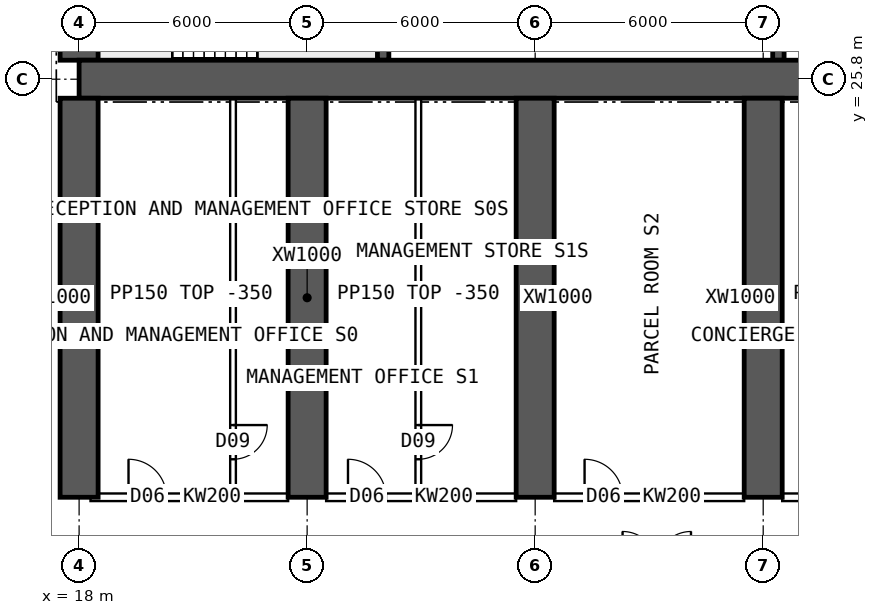
"""IFC4 building model, lengths in metres.
Left out: names, types, materials, properties, quantities, classifications, styles, units other than length and angle.
Written with IfcOpenShell. Run it as: python <this file> out.ifc"""

import sys

from ifc_helpers import new_model, si_unit, direction, frame, frame_2d, origin, place, context, subcontext, project, spatial, rectangle, extrude, element, fill, save


model = new_model("IFC4")
c1 = context("Model", 3, precision=1e-05, world=origin(), true_north=direction((0.0, 1.0)))
c2 = subcontext(c1, "Body", "Model", "MODEL_VIEW")
j1 = project(units=[si_unit("LENGTHUNIT", "METRE"), si_unit("PLANEANGLEUNIT", "RADIAN")], contexts=[c1])
p1 = place(None, origin())
s1 = spatial("IfcSite", under=j1, at=p1, CompositionType="ELEMENT")
p2 = place(p1, origin())
s2 = spatial("IfcBuilding", under=s1, at=p2, CompositionType="ELEMENT")
p3 = place(p2, origin())
s3 = spatial("IfcBuildingStorey", under=s2, at=p3, CompositionType="ELEMENT", Elevation=0.0)
p4 = place(p3, frame((18.0, 25.8, 0.0), z_axis=(0.0, 0.0, 1.0), x_axis=(1.0, 0.0, 0.0)))
e1 = element("IfcWall", 1, at=p4, inside=s3, PredefinedType="SHEAR", context=c2, shape_type="SweptSolid", body=[
    extrude(rectangle(XDim=48.0, YDim=1.0, at=frame_2d((24.0, 0.0))), origin(), (0.0, 0.0, 1.0), 6.0),
])
p5 = place(p3, frame((18.0, 26.3, 0.0), z_axis=(0.0, 0.0, 1.0), x_axis=(0.0, 1.0, 0.0)))
e2 = element("IfcWall", 2, at=p5, inside=s3, PredefinedType="SHEAR", context=c2, shape_type="SweptSolid", body=[
    extrude(rectangle(XDim=11.4, YDim=1.0, at=frame_2d((5.7, 0.0))), origin(), (0.0, 0.0, 1.0), 6.0),
])
p6 = place(p5, frame((5.0, 0.0, 0.0)))
e3 = element("IfcOpeningElement", 3, at=p6, cuts=e2, PredefinedType="OPENING", context=c2, shape_type="SweptSolid", body=[
    extrude(rectangle(XDim=1.2, YDim=2.1, at=frame_2d((0.6, 1.05))), frame((0.0, 0.51, 0.0), z_axis=(0.0, -1.0, 0.0), x_axis=(1.0, 0.0, 0.0)), (0.0, 0.0, 1.0), 1.02),
])
for number, where, z_axis, x_axis in (
    (4, (26.0, 26.3, 0.0), (0.0, 0.0, 1.0), (0.0, 1.0, 0.0)),
    (5, (36.4, 26.3, 0.0), (0.0, 0.0, 1.0), (0.0, 1.0, 0.0)),
):
    element("IfcWall", number, at=place(p3, frame(where, z_axis=z_axis, x_axis=x_axis)), inside=s3, PredefinedType="SHEAR", context=c2, shape_type="SweptSolid", body=[
        extrude(rectangle(XDim=3.95, YDim=0.3, at=frame_2d((1.975, 0.0))), origin(), (0.0, 0.0, 1.0), 6.0),
    ])
for number, where, z_axis, x_axis in (
    (6, (18.0, 14.8, 0.0), (0.0, 0.0, 1.0), (0.0, 1.0, 0.0)),
    (7, (24.0, 14.8, 0.0), (0.0, 0.0, 1.0), (0.0, 1.0, 0.0)),
    (8, (30.0, 14.8, 0.0), (0.0, 0.0, 1.0), (0.0, 1.0, 0.0)),
    (9, (36.0, 14.8, 0.0), (0.0, 0.0, 1.0), (0.0, 1.0, 0.0)),
):
    element("IfcWall", number, at=place(p3, frame(where, z_axis=z_axis, x_axis=x_axis)), inside=s3, PredefinedType="SHEAR", context=c2, shape_type="SweptSolid", body=[
        extrude(rectangle(XDim=10.5, YDim=1.0, at=frame_2d((5.25, 0.0))), origin(), (0.0, 0.0, 1.0), 6.0),
    ])
p7 = place(p3, frame((22.05, 14.8, 0.0), z_axis=(0.0, 0.0, 1.0), x_axis=(0.0, 1.0, 0.0)))
e10 = element("IfcWall", 10, at=p7, inside=s3, PredefinedType="PARTITIONING", context=c2, shape_type="SweptSolid", body=[
    extrude(rectangle(XDim=10.7, YDim=0.15, at=frame_2d((5.35, 0.0))), origin(), (0.0, 0.0, 1.0), 5.65),
])
p8 = place(p7, frame((1.0, 0.0, 0.0)))
e11 = element("IfcOpeningElement", 11, at=p8, cuts=e10, PredefinedType="OPENING", context=c2, shape_type="SweptSolid", body=[
    extrude(rectangle(XDim=0.9, YDim=2.1, at=frame_2d((0.45, 1.05))), frame((0.0, 0.085, 0.0), z_axis=(0.0, -1.0, 0.0), x_axis=(1.0, 0.0, 0.0)), (0.0, 0.0, 1.0), 0.17),
])
p9 = place(p3, frame((26.925, 14.8, 0.0), z_axis=(0.0, 0.0, 1.0), x_axis=(0.0, 1.0, 0.0)))
e12 = element("IfcWall", 12, at=p9, inside=s3, PredefinedType="PARTITIONING", context=c2, shape_type="SweptSolid", body=[
    extrude(rectangle(XDim=10.7, YDim=0.15, at=frame_2d((5.35, 0.0))), origin(), (0.0, 0.0, 1.0), 5.65),
])
p10 = place(p9, frame((1.0, 0.0, 0.0)))
e13 = element("IfcOpeningElement", 13, at=p10, cuts=e12, PredefinedType="OPENING", context=c2, shape_type="SweptSolid", body=[
    extrude(rectangle(XDim=0.9, YDim=2.1, at=frame_2d((0.45, 1.05))), frame((0.0, 0.085, 0.0), z_axis=(0.0, -1.0, 0.0), x_axis=(1.0, 0.0, 0.0)), (0.0, 0.0, 1.0), 0.17),
])
p11 = place(p3, frame((18.3, 14.8, 0.0), z_axis=(0.0, 0.0, 1.0), x_axis=(1.0, 0.0, 0.0)))
e14 = element("IfcWall", 14, at=p11, inside=s3, PredefinedType="SOLIDWALL", context=c2, shape_type="SweptSolid", body=[
    extrude(rectangle(XDim=5.2, YDim=0.2, at=frame_2d((2.6, 0.0))), origin(), (0.0, 0.0, 1.0), 5.65),
])
p12 = place(p11, frame((1.0, 0.0, 0.0)))
e15 = element("IfcOpeningElement", 15, at=p12, cuts=e14, PredefinedType="OPENING", context=c2, shape_type="SweptSolid", body=[
    extrude(rectangle(XDim=1.0, YDim=2.1, at=frame_2d((0.5, 1.05))), frame((0.0, 0.11, 0.0), z_axis=(0.0, -1.0, 0.0), x_axis=(1.0, 0.0, 0.0)), (0.0, 0.0, 1.0), 0.22),
])
p13 = place(p3, frame((24.5, 14.8, 0.0), z_axis=(0.0, 0.0, 1.0), x_axis=(1.0, 0.0, 0.0)))
e16 = element("IfcWall", 16, at=p13, inside=s3, PredefinedType="SOLIDWALL", context=c2, shape_type="SweptSolid", body=[
    extrude(rectangle(XDim=5.0, YDim=0.2, at=frame_2d((2.5, 0.0))), origin(), (0.0, 0.0, 1.0), 5.65),
])
p14 = place(p13, frame((0.575, 0.0, 0.0)))
e17 = element("IfcOpeningElement", 17, at=p14, cuts=e16, PredefinedType="OPENING", context=c2, shape_type="SweptSolid", body=[
    extrude(rectangle(XDim=1.0, YDim=2.1, at=frame_2d((0.5, 1.05))), frame((0.0, 0.11, 0.0), z_axis=(0.0, -1.0, 0.0), x_axis=(1.0, 0.0, 0.0)), (0.0, 0.0, 1.0), 0.22),
])
p15 = place(p3, frame((30.5, 14.8, 0.0), z_axis=(0.0, 0.0, 1.0), x_axis=(1.0, 0.0, 0.0)))
e18 = element("IfcWall", 18, at=p15, inside=s3, PredefinedType="SOLIDWALL", context=c2, shape_type="SweptSolid", body=[
    extrude(rectangle(XDim=5.0, YDim=0.2, at=frame_2d((2.5, 0.0))), origin(), (0.0, 0.0, 1.0), 5.65),
])
p16 = place(p15, frame((0.8, 0.0, 0.0)))
e19 = element("IfcOpeningElement", 19, at=p16, cuts=e18, PredefinedType="OPENING", context=c2, shape_type="SweptSolid", body=[
    extrude(rectangle(XDim=1.0, YDim=2.1, at=frame_2d((0.5, 1.05))), frame((0.0, 0.11, 0.0), z_axis=(0.0, -1.0, 0.0), x_axis=(1.0, 0.0, 0.0)), (0.0, 0.0, 1.0), 0.22),
])
p17 = place(p3, frame((36.5, 14.8, 0.0), z_axis=(0.0, 0.0, 1.0), x_axis=(1.0, 0.0, 0.0)))
e20 = element("IfcWall", 20, at=p17, inside=s3, PredefinedType="SOLIDWALL", context=c2, shape_type="SweptSolid", body=[
    extrude(rectangle(XDim=5.0, YDim=0.2, at=frame_2d((2.5, 0.0))), origin(), (0.0, 0.0, 1.0), 5.65),
])
p18 = place(p17, frame((0.575, 0.0, 0.0)))
e21 = element("IfcOpeningElement", 21, at=p18, cuts=e20, PredefinedType="OPENING", context=c2, shape_type="SweptSolid", body=[
    extrude(rectangle(XDim=1.0, YDim=2.1, at=frame_2d((0.5, 1.05))), frame((0.0, 0.11, 0.0), z_axis=(0.0, -1.0, 0.0), x_axis=(1.0, 0.0, 0.0)), (0.0, 0.0, 1.0), 0.22),
])
p19 = place(p8, origin())
e22 = element("IfcDoor", 22, at=p19, inside=s3, OperationType="SINGLE_SWING_RIGHT", PredefinedType="DOOR", context=c2, shape_type="SweptSolid", body=[
    extrude(rectangle(XDim=0.9, YDim=2.1, at=frame_2d((0.45, 1.05))), frame((0.0, 0.025, 0.0), z_axis=(0.0, -1.0, 0.0), x_axis=(1.0, 0.0, 0.0)), (0.0, 0.0, 1.0), 0.05),
])
fill(e11, e22)
p20 = place(p10, origin())
e23 = element("IfcDoor", 23, at=p20, inside=s3, OperationType="SINGLE_SWING_RIGHT", PredefinedType="DOOR", context=c2, shape_type="SweptSolid", body=[
    extrude(rectangle(XDim=0.9, YDim=2.1, at=frame_2d((0.45, 1.05))), frame((0.0, 0.025, 0.0), z_axis=(0.0, -1.0, 0.0), x_axis=(1.0, 0.0, 0.0)), (0.0, 0.0, 1.0), 0.05),
])
fill(e13, e23)
p21 = place(p12, origin())
e24 = element("IfcDoor", 24, at=p21, inside=s3, OperationType="SINGLE_SWING_LEFT", PredefinedType="DOOR", context=c2, shape_type="SweptSolid", body=[
    extrude(rectangle(XDim=1.0, YDim=2.1, at=frame_2d((0.5, 1.05))), frame((0.0, 0.025, 0.0), z_axis=(0.0, -1.0, 0.0), x_axis=(1.0, 0.0, 0.0)), (0.0, 0.0, 1.0), 0.05),
])
fill(e15, e24)
p22 = place(p14, origin())
e25 = element("IfcDoor", 25, at=p22, inside=s3, OperationType="SINGLE_SWING_LEFT", PredefinedType="DOOR", context=c2, shape_type="SweptSolid", body=[
    extrude(rectangle(XDim=1.0, YDim=2.1, at=frame_2d((0.5, 1.05))), frame((0.0, 0.025, 0.0), z_axis=(0.0, -1.0, 0.0), x_axis=(1.0, 0.0, 0.0)), (0.0, 0.0, 1.0), 0.05),
])
fill(e17, e25)
p23 = place(p16, origin())
e26 = element("IfcDoor", 26, at=p23, inside=s3, OperationType="SINGLE_SWING_LEFT", PredefinedType="DOOR", context=c2, shape_type="SweptSolid", body=[
    extrude(rectangle(XDim=1.0, YDim=2.1, at=frame_2d((0.5, 1.05))), frame((0.0, 0.025, 0.0), z_axis=(0.0, -1.0, 0.0), x_axis=(1.0, 0.0, 0.0)), (0.0, 0.0, 1.0), 0.05),
])
fill(e19, e26)
save(model, sys.argv[1])
